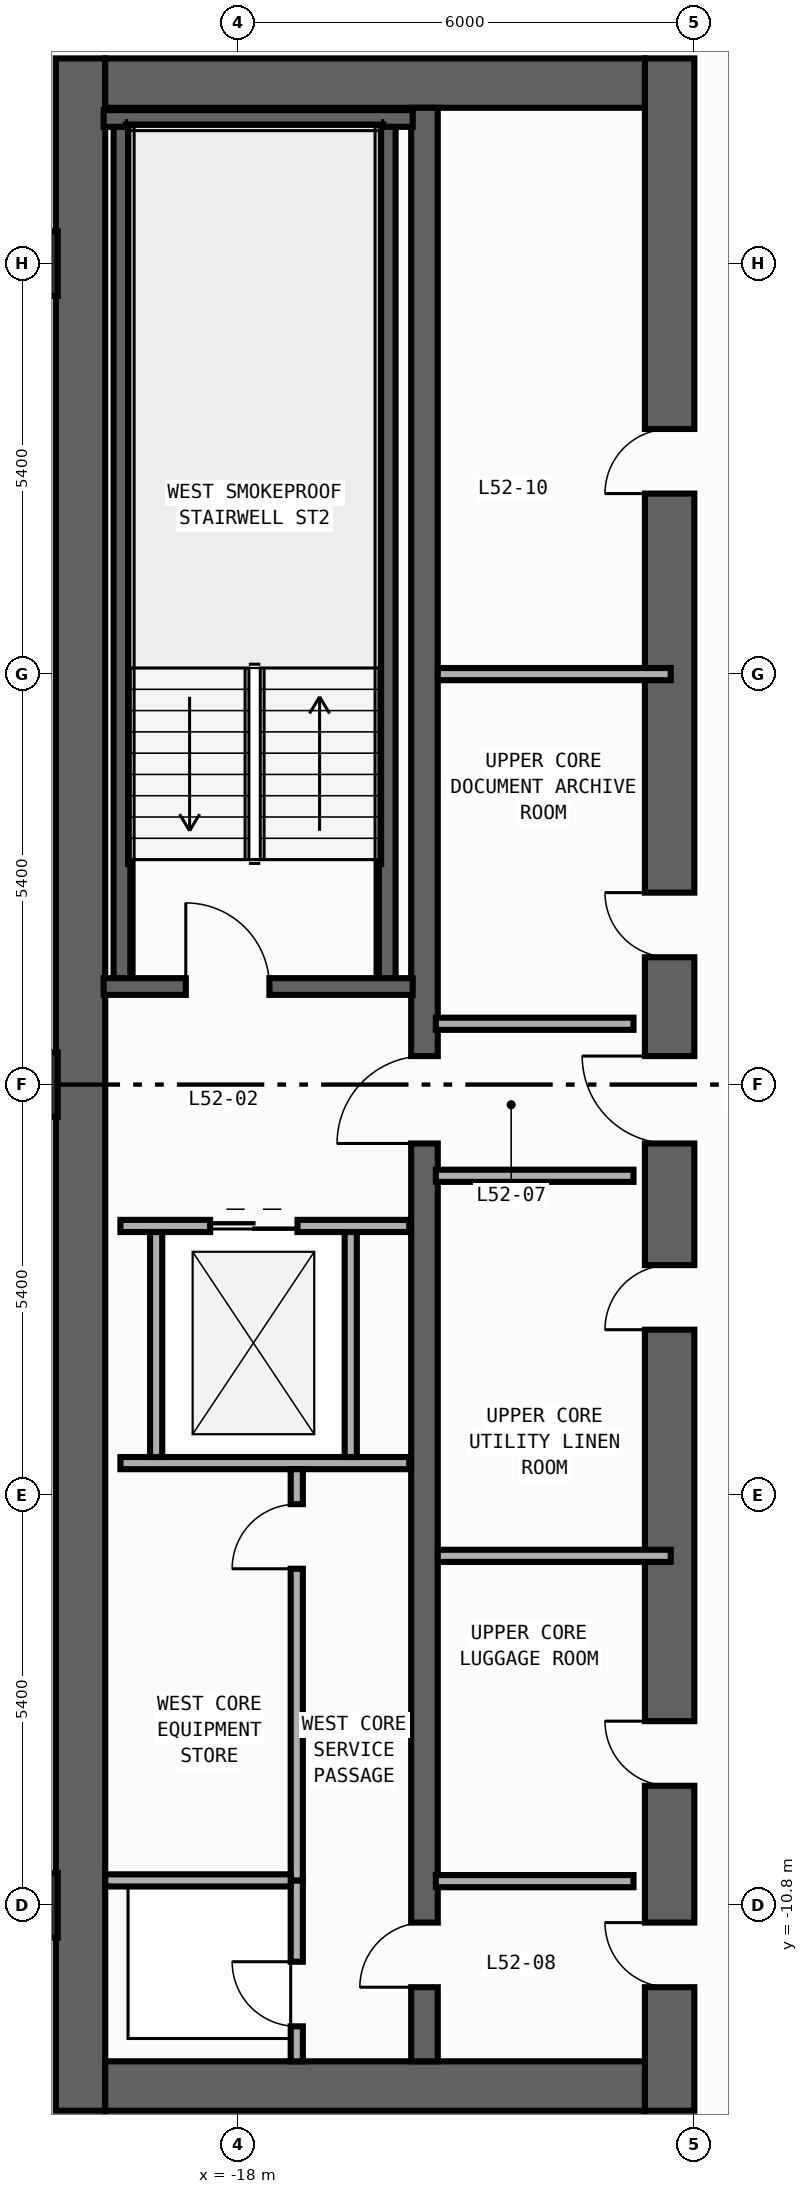
"""IFC4 building model, lengths in metres.
Left out: names, types, materials, properties, quantities, classifications, styles, units other than length and angle.
Written with IfcOpenShell. Run it as: python <this file> out.ifc"""

import sys

from ifc_helpers import new_model, si_unit, direction, frame, frame_2d, origin, origin_2d, place, context, subcontext, project, spatial, rectangle, extrude, element, fill, save


model = new_model("IFC4")
c1 = context("Model", 3, precision=1e-05, world=origin(), true_north=direction((0.0, 1.0)))
c2 = subcontext(c1, "Body", "Model", "MODEL_VIEW")
j1 = project(units=[si_unit("LENGTHUNIT", "METRE"), si_unit("PLANEANGLEUNIT", "RADIAN")], contexts=[c1])
p1 = place(None, origin())
s1 = spatial("IfcSite", under=j1, at=p1, CompositionType="ELEMENT")
p2 = place(p1, origin())
s2 = spatial("IfcBuilding", under=s1, at=p2, CompositionType="ELEMENT")
p3 = place(p2, frame((0.0, 0.0, 226.0)))
s3 = spatial("IfcBuildingStorey", under=s2, at=p3, CompositionType="ELEMENT", Elevation=226.0)
p4 = place(p3, frame((-20.075, -13.5, 0.0), z_axis=(0.0, 0.0, 1.0), x_axis=(0.0, 1.0, 0.0)))
e1 = element("IfcWall", 1, at=p4, inside=s3, PredefinedType="SHEAR", context=c2, shape_type="SweptSolid", body=[
    extrude(rectangle(XDim=27.0, YDim=0.65, at=frame_2d((13.5, 0.0))), origin(), (0.0, 0.0, 1.0), 3.34),
])
p5 = place(p3, frame((-12.325, -13.5, 0.0), z_axis=(0.0, 0.0, 1.0), x_axis=(0.0, 1.0, 0.0)))
e2 = element("IfcWall", 2, at=p5, inside=s3, PredefinedType="SHEAR", context=c2, shape_type="SweptSolid", body=[
    extrude(rectangle(XDim=27.0, YDim=0.65, at=frame_2d((13.5, 0.0))), origin(), (0.0, 0.0, 1.0), 3.34),
])
p6 = place(p5, frame((15.175, 0.0, 0.0)))
e3 = element("IfcOpeningElement", 3, at=p6, cuts=e2, PredefinedType="OPENING", context=c2, shape_type="SweptSolid", body=[
    extrude(rectangle(XDim=0.85, YDim=2.1, at=frame_2d((0.425, 1.05))), frame((0.0, 0.335, 0.0), z_axis=(0.0, -1.0, 0.0), x_axis=(1.0, 0.0, 0.0)), (0.0, 0.0, 1.0), 0.67),
])
p7 = place(p5, frame((21.275, 0.0, 0.0)))
e4 = element("IfcOpeningElement", 4, at=p7, cuts=e2, PredefinedType="OPENING", context=c2, shape_type="SweptSolid", body=[
    extrude(rectangle(XDim=0.85, YDim=2.1, at=frame_2d((0.425, 1.05))), frame((0.0, 0.335, 0.0), z_axis=(0.0, -1.0, 0.0), x_axis=(1.0, 0.0, 0.0)), (0.0, 0.0, 1.0), 0.67),
])
p8 = place(p5, frame((4.275, 0.0, 0.0)))
e5 = element("IfcOpeningElement", 5, at=p8, cuts=e2, PredefinedType="OPENING", context=c2, shape_type="SweptSolid", body=[
    extrude(rectangle(XDim=0.85, YDim=2.1, at=frame_2d((0.425, 1.05))), frame((0.0, 0.335, 0.0), z_axis=(0.0, -1.0, 0.0), x_axis=(1.0, 0.0, 0.0)), (0.0, 0.0, 1.0), 0.67),
])
p9 = place(p5, frame((10.275, 0.0, 0.0)))
e6 = element("IfcOpeningElement", 6, at=p9, cuts=e2, PredefinedType="OPENING", context=c2, shape_type="SweptSolid", body=[
    extrude(rectangle(XDim=0.85, YDim=2.1, at=frame_2d((0.425, 1.05))), frame((0.0, 0.335, 0.0), z_axis=(0.0, -1.0, 0.0), x_axis=(1.0, 0.0, 0.0)), (0.0, 0.0, 1.0), 0.67),
])
p10 = place(p5, frame((12.725, 0.0, 0.0)))
e7 = element("IfcOpeningElement", 7, at=p10, cuts=e2, PredefinedType="OPENING", context=c2, shape_type="SweptSolid", body=[
    extrude(rectangle(XDim=1.15, YDim=2.2, at=frame_2d((0.575, 1.1))), frame((0.0, 0.335, 0.0), z_axis=(0.0, -1.0, 0.0), x_axis=(1.0, 0.0, 0.0)), (0.0, 0.0, 1.0), 0.67),
])
p11 = place(p5, frame((1.625, 0.0, 0.0)))
e8 = element("IfcOpeningElement", 8, at=p11, cuts=e2, PredefinedType="OPENING", context=c2, shape_type="SweptSolid", body=[
    extrude(rectangle(XDim=0.85, YDim=2.1, at=frame_2d((0.425, 1.05))), frame((0.0, 0.335, 0.0), z_axis=(0.0, -1.0, 0.0), x_axis=(1.0, 0.0, 0.0)), (0.0, 0.0, 1.0), 0.67),
])
for number, where, z_axis, x_axis in (
    (9, (-19.75, -13.175, 0.0), (0.0, 0.0, 1.0), (1.0, 0.0, 0.0)),
    (10, (-19.75, 13.175, 0.0), (0.0, 0.0, 1.0), (1.0, 0.0, 0.0)),
):
    element("IfcWall", number, at=place(p3, frame(where, z_axis=z_axis, x_axis=x_axis)), inside=s3, PredefinedType="SHEAR", context=c2, shape_type="SweptSolid", body=[
        extrude(rectangle(XDim=7.1, YDim=0.65, at=frame_2d((3.55, 0.0))), origin(), (0.0, 0.0, 1.0), 3.34),
    ])
p12 = place(p3, frame((-15.55, -12.85, 0.0), z_axis=(0.0, 0.0, 1.0), x_axis=(0.0, 1.0, 0.0)))
e11 = element("IfcWall", 11, at=p12, inside=s3, PredefinedType="SHEAR", context=c2, shape_type="SweptSolid", body=[
    extrude(rectangle(XDim=25.7, YDim=0.35, at=frame_2d((12.85, 0.0))), origin(), (0.0, 0.0, 1.0), 3.34),
])
p13 = place(p12, frame((12.075, 0.0, 0.0)))
e12 = element("IfcOpeningElement", 12, at=p13, cuts=e11, PredefinedType="OPENING", context=c2, shape_type="SweptSolid", body=[
    extrude(rectangle(XDim=1.15, YDim=2.2, at=frame_2d((0.575, 1.1))), frame((0.0, 0.185, 0.0), z_axis=(0.0, -1.0, 0.0), x_axis=(1.0, 0.0, 0.0)), (0.0, 0.0, 1.0), 0.37),
])
p14 = place(p12, frame((0.975, 0.0, 0.0)))
e13 = element("IfcOpeningElement", 13, at=p14, cuts=e11, PredefinedType="OPENING", context=c2, shape_type="SweptSolid", body=[
    extrude(rectangle(XDim=0.85, YDim=2.1, at=frame_2d((0.425, 1.05))), frame((0.0, 0.185, 0.0), z_axis=(0.0, -1.0, 0.0), x_axis=(1.0, 0.0, 0.0)), (0.0, 0.0, 1.0), 0.37),
])
for number, where, z_axis, x_axis in (
    (14, (-16.04, 1.29, 0.0), (0.0, 0.0, 1.0), (0.0, 1.0, 0.0)),
    (15, (-19.53, 1.29, 0.0), (0.0, 0.0, 1.0), (0.0, 1.0, 0.0)),
):
    element("IfcWall", number, at=place(p3, frame(where, z_axis=z_axis, x_axis=x_axis)), inside=s3, PredefinedType="SHEAR", context=c2, shape_type="SweptSolid", body=[
        extrude(rectangle(XDim=11.42, YDim=0.22, at=frame_2d((5.71, 0.0))), origin(), (0.0, 0.0, 1.0), 3.34),
    ])
p15 = place(p3, frame((-19.77, 12.71, 0.0), z_axis=(0.0, 0.0, 1.0), x_axis=(1.0, 0.0, 0.0)))
e16 = element("IfcWall", 16, at=p15, inside=s3, PredefinedType="SHEAR", context=c2, shape_type="SweptSolid", body=[
    extrude(rectangle(XDim=4.065, YDim=0.22, at=frame_2d((2.032, 0.0))), origin(), (0.0, 0.0, 1.0), 3.34),
])
p16 = place(p3, frame((-19.77, 1.29, 0.0), z_axis=(0.0, 0.0, 1.0), x_axis=(1.0, 0.0, 0.0)))
e17 = element("IfcWall", 17, at=p16, inside=s3, PredefinedType="SHEAR", context=c2, shape_type="SweptSolid", body=[
    extrude(rectangle(XDim=4.065, YDim=0.22, at=frame_2d((2.032, 0.0))), origin(), (0.0, 0.0, 1.0), 3.34),
])
p17 = place(p16, frame((1.08, 0.0, 0.0)))
e18 = element("IfcOpeningElement", 18, at=p17, cuts=e17, PredefinedType="OPENING", context=c2, shape_type="SweptSolid", body=[
    extrude(rectangle(XDim=1.1, YDim=2.2, at=frame_2d((0.55, 1.1))), frame((0.0, 0.12, 0.0), z_axis=(0.0, -1.0, 0.0), x_axis=(1.0, 0.0, 0.0)), (0.0, 0.0, 1.0), 0.24),
])
for number, where, z_axis, x_axis in (
    (19, (-20.8, -10.8, 0.0), (0.0, 0.0, 1.0), (1.0, 0.0, 0.0)),
    (20, (-20.8, 0.0, 0.0), (0.0, 0.0, 1.0), (1.0, 0.0, 0.0)),
    (21, (-20.8, 10.8, 0.0), (0.0, 0.0, 1.0), (1.0, 0.0, 0.0)),
):
    element("IfcColumn", number, at=place(p3, frame(where, z_axis=z_axis, x_axis=x_axis)), inside=s3, PredefinedType="COLUMN", context=c2, shape_type="SweptSolid", body=[
        extrude(rectangle(XDim=0.85, YDim=0.85, at=origin_2d()), origin(), (0.0, 0.0, 1.0), 3.6),
    ])
p18 = place(p3, frame((-19.55, -1.86, 0.0), z_axis=(0.0, 0.0, 1.0), x_axis=(1.0, 0.0, 0.0)))
e22 = element("IfcWall", 22, at=p18, inside=s3, PredefinedType="STANDARD", context=c2, shape_type="SweptSolid", body=[
    extrude(rectangle(XDim=3.8, YDim=0.16, at=frame_2d((1.9, 0.0))), origin(), (0.0, 0.0, 1.0), 3.34),
])
p19 = place(p18, frame((1.18, 0.0, 0.0)))
e23 = element("IfcOpeningElement", 23, at=p19, cuts=e22, PredefinedType="OPENING", context=c2, shape_type="SweptSolid", body=[
    extrude(rectangle(XDim=1.15, YDim=2.2, at=frame_2d((0.575, 1.1))), frame((0.0, 0.09, 0.0), z_axis=(0.0, -1.0, 0.0), x_axis=(1.0, 0.0, 0.0)), (0.0, 0.0, 1.0), 0.18),
])
p20 = place(p3, frame((-19.55, -4.98, 0.0), z_axis=(0.0, 0.0, 1.0), x_axis=(1.0, 0.0, 0.0)))
e24 = element("IfcWall", 24, at=p20, inside=s3, PredefinedType="STANDARD", context=c2, shape_type="SweptSolid", body=[
    extrude(rectangle(XDim=3.8, YDim=0.16, at=frame_2d((1.9, 0.0))), origin(), (0.0, 0.0, 1.0), 3.34),
])
for number, where, z_axis, x_axis in (
    (25, (-19.08, -4.9, 0.0), (0.0, 0.0, 1.0), (0.0, 1.0, 0.0)),
    (26, (-16.52, -4.9, 0.0), (0.0, 0.0, 1.0), (0.0, 1.0, 0.0)),
):
    element("IfcWall", number, at=place(p3, frame(where, z_axis=z_axis, x_axis=x_axis)), inside=s3, PredefinedType="STANDARD", context=c2, shape_type="SweptSolid", body=[
        extrude(rectangle(XDim=2.96, YDim=0.16, at=frame_2d((1.48, 0.0))), origin(), (0.0, 0.0, 1.0), 3.34),
    ])
for number, where, z_axis, x_axis in (
    (27, (-15.4, 0.8, 0.0), (0.0, 0.0, 1.0), (1.0, 0.0, 0.0)),
    (28, (-15.4, -1.2, 0.0), (0.0, 0.0, 1.0), (1.0, 0.0, 0.0)),
    (29, (-15.4, -10.48, 0.0), (0.0, 0.0, 1.0), (1.0, 0.0, 0.0)),
):
    element("IfcWall", number, at=place(p3, frame(where, z_axis=z_axis, x_axis=x_axis)), inside=s3, PredefinedType="STANDARD", context=c2, shape_type="SweptSolid", body=[
        extrude(rectangle(XDim=2.6, YDim=0.16, at=frame_2d((1.3, 0.0))), origin(), (0.0, 0.0, 1.0), 3.34),
    ])
p21 = place(p3, frame((-17.23, -12.85, 0.0), z_axis=(0.0, 0.0, 1.0), x_axis=(0.0, 1.0, 0.0)))
e30 = element("IfcWall", 30, at=p21, inside=s3, PredefinedType="PARTITIONING", context=c2, shape_type="SweptSolid", body=[
    extrude(rectangle(XDim=2.38, YDim=0.16, at=frame_2d((1.19, 0.0))), origin(), (0.0, 0.0, 1.0), 3.34),
])
p22 = place(p21, frame((0.46, 0.0, 0.0)))
e31 = element("IfcOpeningElement", 31, at=p22, cuts=e30, PredefinedType="OPENING", context=c2, shape_type="SweptSolid", body=[
    extrude(rectangle(XDim=0.85, YDim=2.1, at=frame_2d((0.425, 1.05))), frame((0.0, 0.09, 0.0), z_axis=(0.0, -1.0, 0.0), x_axis=(1.0, 0.0, 0.0)), (0.0, 0.0, 1.0), 0.18),
])
p23 = place(p3, frame((-17.23, -10.47, 0.0), z_axis=(0.0, 0.0, 1.0), x_axis=(0.0, 1.0, 0.0)))
e32 = element("IfcWall", 32, at=p23, inside=s3, PredefinedType="PARTITIONING", context=c2, shape_type="SweptSolid", body=[
    extrude(rectangle(XDim=5.41, YDim=0.16, at=frame_2d((2.705, 0.0))), origin(), (0.0, 0.0, 1.0), 3.34),
])
p24 = place(p23, frame((4.1, 0.0, 0.0)))
e33 = element("IfcOpeningElement", 33, at=p24, cuts=e32, PredefinedType="OPENING", context=c2, shape_type="SweptSolid", body=[
    extrude(rectangle(XDim=0.85, YDim=2.1, at=frame_2d((0.425, 1.05))), frame((0.0, 0.09, 0.0), z_axis=(0.0, -1.0, 0.0), x_axis=(1.0, 0.0, 0.0)), (0.0, 0.0, 1.0), 0.18),
])
p25 = place(p3, frame((-19.75, -10.47, 0.0), z_axis=(0.0, 0.0, 1.0), x_axis=(1.0, 0.0, 0.0)))
e34 = element("IfcWall", 34, at=p25, inside=s3, PredefinedType="PARTITIONING", context=c2, shape_type="SweptSolid", body=[
    extrude(rectangle(XDim=2.44, YDim=0.16, at=frame_2d((1.22, 0.0))), origin(), (0.0, 0.0, 1.0), 3.34),
])
for number, where, z_axis, x_axis in (
    (35, (-15.375, 5.4, 0.0), (0.0, 0.0, 1.0), (1.0, 0.0, 0.0)),
    (36, (-15.375, -6.2, 0.0), (0.0, 0.0, 1.0), (1.0, 0.0, 0.0)),
):
    element("IfcWall", number, at=place(p3, frame(where, z_axis=z_axis, x_axis=x_axis)), inside=s3, PredefinedType="PARTITIONING", context=c2, shape_type="SweptSolid", body=[
        extrude(rectangle(XDim=3.065, YDim=0.16, at=frame_2d((1.532, 0.0))), origin(), (0.0, 0.0, 1.0), 3.34),
    ])
p26 = place(p17, origin())
e37 = element("IfcDoor", 37, at=p26, inside=s3, OperationType="SINGLE_SWING_LEFT", PredefinedType="DOOR", context=c2, shape_type="SweptSolid", body=[
    extrude(rectangle(XDim=1.1, YDim=2.2, at=frame_2d((0.55, 1.1))), frame((0.0, 0.025, 0.0), z_axis=(0.0, -1.0, 0.0), x_axis=(1.0, 0.0, 0.0)), (0.0, 0.0, 1.0), 0.05),
])
fill(e18, e37)
p27 = place(p6, origin())
e38 = element("IfcDoor", 38, at=p27, inside=s3, OperationType="SINGLE_SWING_RIGHT", PredefinedType="DOOR", context=c2, shape_type="SweptSolid", body=[
    extrude(rectangle(XDim=0.85, YDim=2.1, at=frame_2d((0.425, 1.05))), frame((0.0, 0.025, 0.0), z_axis=(0.0, -1.0, 0.0), x_axis=(1.0, 0.0, 0.0)), (0.0, 0.0, 1.0), 0.05),
])
fill(e3, e38)
p28 = place(p7, origin())
e39 = element("IfcDoor", 39, at=p28, inside=s3, OperationType="SINGLE_SWING_LEFT", PredefinedType="DOOR", context=c2, shape_type="SweptSolid", body=[
    extrude(rectangle(XDim=0.85, YDim=2.1, at=frame_2d((0.425, 1.05))), frame((0.0, 0.025, 0.0), z_axis=(0.0, -1.0, 0.0), x_axis=(1.0, 0.0, 0.0)), (0.0, 0.0, 1.0), 0.05),
])
fill(e4, e39)
p29 = place(p8, origin())
e40 = element("IfcDoor", 40, at=p29, inside=s3, OperationType="SINGLE_SWING_RIGHT", PredefinedType="DOOR", context=c2, shape_type="SweptSolid", body=[
    extrude(rectangle(XDim=0.85, YDim=2.1, at=frame_2d((0.425, 1.05))), frame((0.0, 0.025, 0.0), z_axis=(0.0, -1.0, 0.0), x_axis=(1.0, 0.0, 0.0)), (0.0, 0.0, 1.0), 0.05),
])
fill(e5, e40)
p30 = place(p9, origin())
e41 = element("IfcDoor", 41, at=p30, inside=s3, OperationType="SINGLE_SWING_LEFT", PredefinedType="DOOR", context=c2, shape_type="SweptSolid", body=[
    extrude(rectangle(XDim=0.85, YDim=2.1, at=frame_2d((0.425, 1.05))), frame((0.0, 0.025, 0.0), z_axis=(0.0, -1.0, 0.0), x_axis=(1.0, 0.0, 0.0)), (0.0, 0.0, 1.0), 0.05),
])
fill(e6, e41)
p31 = place(p10, origin())
e42 = element("IfcDoor", 42, at=p31, inside=s3, OperationType="SINGLE_SWING_RIGHT", PredefinedType="DOOR", context=c2, shape_type="SweptSolid", body=[
    extrude(rectangle(XDim=1.15, YDim=2.2, at=frame_2d((0.575, 1.1))), frame((0.0, 0.025, 0.0), z_axis=(0.0, -1.0, 0.0), x_axis=(1.0, 0.0, 0.0)), (0.0, 0.0, 1.0), 0.05),
])
fill(e7, e42)
p32 = place(p13, origin())
e43 = element("IfcDoor", 43, at=p32, inside=s3, OperationType="SINGLE_SWING_LEFT", PredefinedType="DOOR", context=c2, shape_type="SweptSolid", body=[
    extrude(rectangle(XDim=1.15, YDim=2.2, at=frame_2d((0.575, 1.1))), frame((0.0, 0.025, 0.0), z_axis=(0.0, -1.0, 0.0), x_axis=(1.0, 0.0, 0.0)), (0.0, 0.0, 1.0), 0.05),
])
fill(e12, e43)
p33 = place(p11, origin())
e44 = element("IfcDoor", 44, at=p33, inside=s3, OperationType="SINGLE_SWING_RIGHT", PredefinedType="DOOR", context=c2, shape_type="SweptSolid", body=[
    extrude(rectangle(XDim=0.85, YDim=2.1, at=frame_2d((0.425, 1.05))), frame((0.0, 0.025, 0.0), z_axis=(0.0, -1.0, 0.0), x_axis=(1.0, 0.0, 0.0)), (0.0, 0.0, 1.0), 0.05),
])
fill(e8, e44)
p34 = place(p14, origin())
e45 = element("IfcDoor", 45, at=p34, inside=s3, OperationType="SINGLE_SWING_LEFT", PredefinedType="DOOR", context=c2, shape_type="SweptSolid", body=[
    extrude(rectangle(XDim=0.85, YDim=2.1, at=frame_2d((0.425, 1.05))), frame((0.0, 0.025, 0.0), z_axis=(0.0, -1.0, 0.0), x_axis=(1.0, 0.0, 0.0)), (0.0, 0.0, 1.0), 0.05),
])
fill(e13, e45)
p35 = place(p19, origin())
e46 = element("IfcDoor", 46, at=p35, inside=s3, OperationType="DOUBLE_DOOR_SLIDING", PredefinedType="DOOR", context=c2, shape_type="SweptSolid", body=[
    extrude(rectangle(XDim=1.15, YDim=2.2, at=frame_2d((0.575, 1.1))), frame((0.0, 0.025, 0.0), z_axis=(0.0, -1.0, 0.0), x_axis=(1.0, 0.0, 0.0)), (0.0, 0.0, 1.0), 0.05),
])
fill(e23, e46)
p36 = place(p22, origin())
e47 = element("IfcDoor", 47, at=p36, inside=s3, OperationType="SINGLE_SWING_RIGHT", PredefinedType="DOOR", context=c2, shape_type="SweptSolid", body=[
    extrude(rectangle(XDim=0.85, YDim=2.1, at=frame_2d((0.425, 1.05))), frame((0.0, 0.025, 0.0), z_axis=(0.0, -1.0, 0.0), x_axis=(1.0, 0.0, 0.0)), (0.0, 0.0, 1.0), 0.05),
])
fill(e31, e47)
p37 = place(p24, origin())
e48 = element("IfcDoor", 48, at=p37, inside=s3, OperationType="SINGLE_SWING_LEFT", PredefinedType="DOOR", context=c2, shape_type="SweptSolid", body=[
    extrude(rectangle(XDim=0.85, YDim=2.1, at=frame_2d((0.425, 1.05))), frame((0.0, 0.025, 0.0), z_axis=(0.0, -1.0, 0.0), x_axis=(1.0, 0.0, 0.0)), (0.0, 0.0, 1.0), 0.05),
])
fill(e33, e48)
save(model, sys.argv[1])
